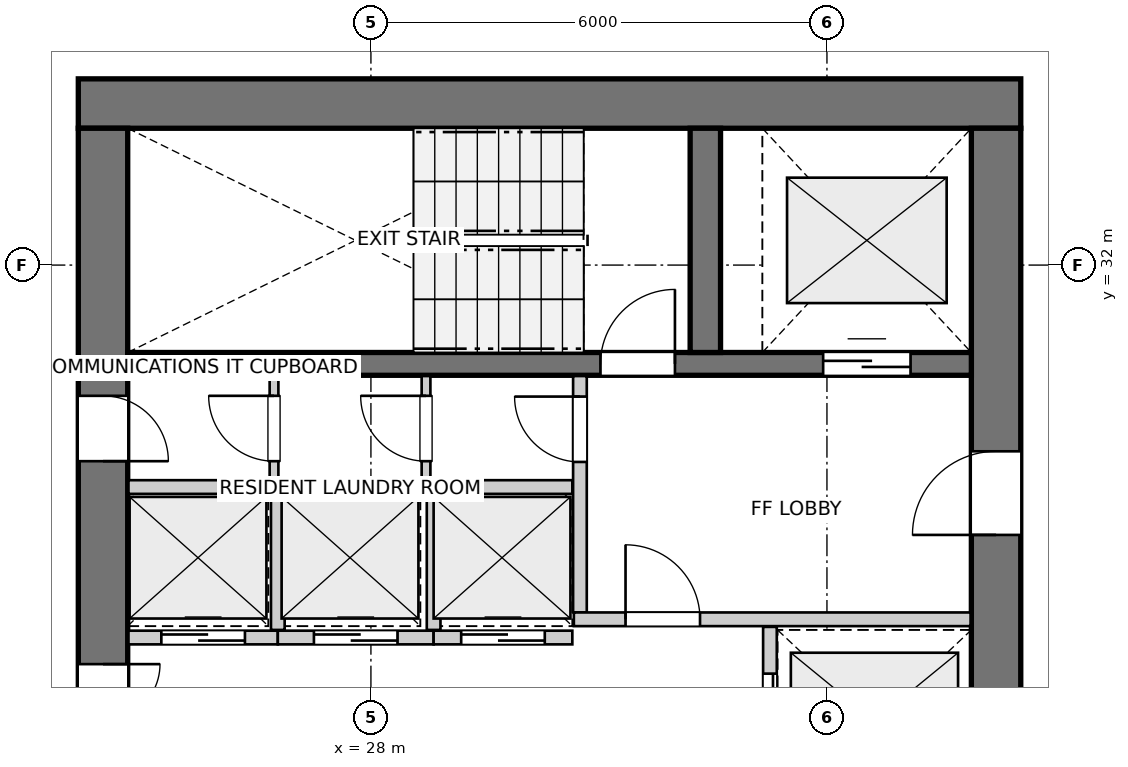
"""IFC4 building model, lengths in metres.
Left out: names, types, materials, properties, quantities, classifications, styles, units other than length and angle.
Written with IfcOpenShell. Run it as: python <this file> out.ifc"""

import sys

from ifc_helpers import new_model, si_unit, direction, frame, frame_2d, origin, place, context, subcontext, project, spatial, rectangle, extrude, source, transform, mapped, element, fill, save


model = new_model("IFC4")
c1 = context("Model", 3, precision=1e-05, world=origin(), true_north=direction((0.0, 1.0)))
c2 = subcontext(c1, "Body", "Model", "MODEL_VIEW")
j1 = project(units=[si_unit("LENGTHUNIT", "METRE"), si_unit("PLANEANGLEUNIT", "RADIAN")], contexts=[c1])
p1 = place(None, origin())
s1 = spatial("IfcSite", under=j1, at=p1, CompositionType="ELEMENT")
p2 = place(p1, origin())
s2 = spatial("IfcBuilding", under=s1, at=p2, CompositionType="ELEMENT")
p3 = place(p2, frame((0.0, 0.0, 158.6)))
s3 = spatial("IfcBuildingStorey", under=s2, at=p3, CompositionType="ELEMENT", Elevation=158.6)
p4 = place(p3, frame((36.55, 34.125, 0.0), z_axis=(0.0, 0.0, 1.0), x_axis=(-1.0, 0.0, 0.0)))
e1 = element("IfcWall", 1, at=p4, inside=s3, PredefinedType="SHEAR", context=c2, shape_type="SweptSolid", body=[
    extrude(rectangle(XDim=12.4, YDim=0.65, at=frame_2d((6.2, 0.0))), origin(), (0.0, 0.0, 1.0), 2.95),
])
p5 = place(p3, frame((24.475, 33.8, 0.0), z_axis=(0.0, 0.0, 1.0), x_axis=(0.0, -1.0, 0.0)))
e2 = element("IfcWall", 2, at=p5, inside=s3, PredefinedType="SHEAR", context=c2, shape_type="SweptSolid", body=[
    extrude(rectangle(XDim=15.6, YDim=0.65, at=frame_2d((7.8, 0.0))), origin(), (0.0, 0.0, 1.0), 2.95),
])
p6 = place(p5, frame((7.05, 0.0, 0.0)))
e3 = element("IfcOpeningElement", 3, at=p6, cuts=e2, PredefinedType="OPENING", context=c2, shape_type="SweptSolid", body=[
    extrude(rectangle(XDim=1.5, YDim=2.15, at=frame_2d((0.75, 1.075))), frame((0.0, 0.335, 0.0), z_axis=(0.0, -1.0, 0.0), x_axis=(1.0, 0.0, 0.0)), (0.0, 0.0, 1.0), 0.67),
])
p7 = place(p5, frame((3.52, 0.0, 0.0)))
e4 = element("IfcOpeningElement", 4, at=p7, cuts=e2, PredefinedType="OPENING", context=c2, shape_type="SweptSolid", body=[
    extrude(rectangle(XDim=0.86, YDim=2.05, at=frame_2d((0.43, 1.025))), frame((0.0, 0.335, 0.0), z_axis=(0.0, -1.0, 0.0), x_axis=(1.0, 0.0, 0.0)), (0.0, 0.0, 1.0), 0.67),
])
p8 = place(p5, frame((11.22, 0.0, 0.0)))
e5 = element("IfcOpeningElement", 5, at=p8, cuts=e2, PredefinedType="OPENING", context=c2, shape_type="SweptSolid", body=[
    extrude(rectangle(XDim=0.86, YDim=2.05, at=frame_2d((0.43, 1.025))), frame((0.0, 0.335, 0.0), z_axis=(0.0, -1.0, 0.0), x_axis=(1.0, 0.0, 0.0)), (0.0, 0.0, 1.0), 0.67),
])
p9 = place(p3, frame((36.225, 18.2, 0.0), z_axis=(0.0, 0.0, 1.0), x_axis=(0.0, 1.0, 0.0)))
e6 = element("IfcWall", 6, at=p9, inside=s3, PredefinedType="SHEAR", context=c2, shape_type="SweptSolid", body=[
    extrude(rectangle(XDim=15.6, YDim=0.65, at=frame_2d((7.8, 0.0))), origin(), (0.0, 0.0, 1.0), 2.95),
])
p10 = place(p9, frame((4.25, 0.0, 0.0)))
e7 = element("IfcOpeningElement", 7, at=p10, cuts=e6, PredefinedType="OPENING", context=c2, shape_type="SweptSolid", body=[
    extrude(rectangle(XDim=1.1, YDim=2.15, at=frame_2d((0.55, 1.075))), frame((0.0, 0.335, 0.0), z_axis=(0.0, -1.0, 0.0), x_axis=(1.0, 0.0, 0.0)), (0.0, 0.0, 1.0), 0.67),
])
p11 = place(p9, frame((10.25, 0.0, 0.0)))
e8 = element("IfcOpeningElement", 8, at=p11, cuts=e6, PredefinedType="OPENING", context=c2, shape_type="SweptSolid", body=[
    extrude(rectangle(XDim=1.1, YDim=2.15, at=frame_2d((0.55, 1.075))), frame((0.0, 0.335, 0.0), z_axis=(0.0, -1.0, 0.0), x_axis=(1.0, 0.0, 0.0)), (0.0, 0.0, 1.0), 0.67),
])
p12 = place(p3, frame((24.8, 30.7, 0.0), z_axis=(0.0, 0.0, 1.0), x_axis=(1.0, 0.0, 0.0)))
e9 = element("IfcWall", 9, at=p12, inside=s3, PredefinedType="SHEAR", context=c2, shape_type="SweptSolid", body=[
    extrude(rectangle(XDim=11.1, YDim=0.3, at=frame_2d((5.55, 0.0))), origin(), (0.0, 0.0, 1.0), 2.95),
])
p13 = place(p12, frame((6.22, 0.0, 0.0)))
e10 = element("IfcOpeningElement", 10, at=p13, cuts=e9, PredefinedType="OPENING", context=c2, shape_type="SweptSolid", body=[
    extrude(rectangle(XDim=0.98, YDim=2.15, at=frame_2d((0.49, 1.075))), frame((0.0, 0.16, 0.0), z_axis=(0.0, -1.0, 0.0), x_axis=(1.0, 0.0, 0.0)), (0.0, 0.0, 1.0), 0.32),
])
p14 = place(p12, frame((9.15, 0.0, 0.0)))
e11 = element("IfcOpeningElement", 11, at=p14, cuts=e9, PredefinedType="OPENING", context=c2, shape_type="SweptSolid", body=[
    extrude(rectangle(XDim=1.15, YDim=2.15, at=frame_2d((0.575, 1.075))), frame((0.0, 0.16, 0.0), z_axis=(0.0, -1.0, 0.0), x_axis=(1.0, 0.0, 0.0)), (0.0, 0.0, 1.0), 0.32),
])
p15 = place(p3, frame((32.4, 30.85, 0.0), z_axis=(0.0, 0.0, 1.0), x_axis=(0.0, 1.0, 0.0)))
e12 = element("IfcWall", 12, at=p15, inside=s3, PredefinedType="SHEAR", context=c2, shape_type="SweptSolid", body=[
    extrude(rectangle(XDim=2.95, YDim=0.4, at=frame_2d((1.475, 0.0))), origin(), (0.0, 0.0, 1.0), 2.95),
])
p16 = place(p3, frame((30.75, 27.43, 0.0), z_axis=(0.0, 0.0, 1.0), x_axis=(0.0, 1.0, 0.0)))
e13 = element("IfcWall", 13, at=p16, inside=s3, PredefinedType="PARTITIONING", context=c2, shape_type="SweptSolid", body=[
    extrude(rectangle(XDim=3.11, YDim=0.18, at=frame_2d((1.555, 0.0))), origin(), (0.0, 0.0, 1.0), 2.95),
])
p17 = place(p16, frame((1.98, 0.0, 0.0)))
e14 = element("IfcOpeningElement", 14, at=p17, cuts=e13, PredefinedType="OPENING", context=c2, shape_type="SweptSolid", body=[
    extrude(rectangle(XDim=0.86, YDim=2.05, at=frame_2d((0.43, 1.025))), frame((0.0, 0.1, 0.0), z_axis=(0.0, -1.0, 0.0), x_axis=(1.0, 0.0, 0.0)), (0.0, 0.0, 1.0), 0.2),
])
p18 = place(p3, frame((30.67, 27.34, 0.0), z_axis=(0.0, 0.0, 1.0), x_axis=(1.0, 0.0, 0.0)))
e15 = element("IfcWall", 15, at=p18, inside=s3, PredefinedType="PARTITIONING", context=c2, shape_type="SweptSolid", body=[
    extrude(rectangle(XDim=5.22, YDim=0.18, at=frame_2d((2.61, 0.0))), origin(), (0.0, 0.0, 1.0), 2.95),
])
p19 = place(p18, frame((0.68, 0.0, 0.0)))
e16 = element("IfcOpeningElement", 16, at=p19, cuts=e15, PredefinedType="OPENING", context=c2, shape_type="SweptSolid", body=[
    extrude(rectangle(XDim=0.98, YDim=2.15, at=frame_2d((0.49, 1.075))), frame((0.0, 0.1, 0.0), z_axis=(0.0, -1.0, 0.0), x_axis=(1.0, 0.0, 0.0)), (0.0, 0.0, 1.0), 0.2),
])
p20 = place(p3, frame((33.25, 24.76, 0.0), z_axis=(0.0, 0.0, 1.0), x_axis=(0.0, 1.0, 0.0)))
e17 = element("IfcWall", 17, at=p20, inside=s3, PredefinedType="PARTITIONING", context=c2, shape_type="SweptSolid", body=[
    extrude(rectangle(XDim=2.48, YDim=0.18, at=frame_2d((1.24, 0.0))), origin(), (0.0, 0.0, 1.0), 2.95),
])
p21 = place(p20, frame((0.615, 0.0, 0.0)))
e18 = element("IfcOpeningElement", 18, at=p21, cuts=e17, PredefinedType="OPENING", context=c2, shape_type="SweptSolid", body=[
    extrude(rectangle(XDim=1.25, YDim=2.15, at=frame_2d((0.625, 1.075))), frame((0.0, 0.1, 0.0), z_axis=(0.0, -1.0, 0.0), x_axis=(1.0, 0.0, 0.0)), (0.0, 0.0, 1.0), 0.2),
])
p22 = place(p3, frame((24.81, 29.08, 0.0), z_axis=(0.0, 0.0, 1.0), x_axis=(1.0, 0.0, 0.0)))
e19 = element("IfcWall", 19, at=p22, inside=s3, PredefinedType="PARTITIONING", context=c2, shape_type="SweptSolid", body=[
    extrude(rectangle(XDim=5.84, YDim=0.18, at=frame_2d((2.92, 0.0))), origin(), (0.0, 0.0, 1.0), 2.95),
])
p23 = place(p3, frame((24.81, 27.1, 0.0), z_axis=(0.0, 0.0, 1.0), x_axis=(1.0, 0.0, 0.0)))
e20 = element("IfcWall", 20, at=p23, inside=s3, PredefinedType="PARTITIONING", context=c2, shape_type="SweptSolid", body=[
    extrude(rectangle(XDim=1.965, YDim=0.18, at=frame_2d((0.982, 0.0))), origin(), (0.0, 0.0, 1.0), 2.95),
])
p24 = place(p23, frame((0.433, 0.0, 0.0)))
e21 = element("IfcOpeningElement", 21, at=p24, cuts=e20, PredefinedType="OPENING", context=c2, shape_type="SweptSolid", body=[
    extrude(rectangle(XDim=1.1, YDim=2.15, at=frame_2d((0.55, 1.075))), frame((0.0, 0.1, 0.0), z_axis=(0.0, -1.0, 0.0), x_axis=(1.0, 0.0, 0.0)), (0.0, 0.0, 1.0), 0.2),
])
p25 = place(p3, frame((26.775, 27.1, 0.0), z_axis=(0.0, 0.0, 1.0), x_axis=(1.0, 0.0, 0.0)))
e22 = element("IfcWall", 22, at=p25, inside=s3, PredefinedType="PARTITIONING", context=c2, shape_type="SweptSolid", body=[
    extrude(rectangle(XDim=2.05, YDim=0.18, at=frame_2d((1.025, 0.0))), origin(), (0.0, 0.0, 1.0), 2.95),
])
p26 = place(p25, frame((0.475, 0.0, 0.0)))
e23 = element("IfcOpeningElement", 23, at=p26, cuts=e22, PredefinedType="OPENING", context=c2, shape_type="SweptSolid", body=[
    extrude(rectangle(XDim=1.1, YDim=2.15, at=frame_2d((0.55, 1.075))), frame((0.0, 0.1, 0.0), z_axis=(0.0, -1.0, 0.0), x_axis=(1.0, 0.0, 0.0)), (0.0, 0.0, 1.0), 0.2),
])
p27 = place(p3, frame((26.775, 27.2, 0.0), z_axis=(0.0, 0.0, 1.0), x_axis=(0.0, 1.0, 0.0)))
e24 = element("IfcWall", 24, at=p27, inside=s3, PredefinedType="PARTITIONING", context=c2, shape_type="SweptSolid", body=[
    extrude(rectangle(XDim=1.78, YDim=0.18, at=frame_2d((0.89, 0.0))), origin(), (0.0, 0.0, 1.0), 2.95),
])
p28 = place(p3, frame((28.825, 27.1, 0.0), z_axis=(0.0, 0.0, 1.0), x_axis=(1.0, 0.0, 0.0)))
e25 = element("IfcWall", 25, at=p28, inside=s3, PredefinedType="PARTITIONING", context=c2, shape_type="SweptSolid", body=[
    extrude(rectangle(XDim=1.825, YDim=0.18, at=frame_2d((0.913, 0.0))), origin(), (0.0, 0.0, 1.0), 2.95),
])
p29 = place(p28, frame((0.363, 0.0, 0.0)))
e26 = element("IfcOpeningElement", 26, at=p29, cuts=e25, PredefinedType="OPENING", context=c2, shape_type="SweptSolid", body=[
    extrude(rectangle(XDim=1.1, YDim=2.15, at=frame_2d((0.55, 1.075))), frame((0.0, 0.1, 0.0), z_axis=(0.0, -1.0, 0.0), x_axis=(1.0, 0.0, 0.0)), (0.0, 0.0, 1.0), 0.2),
])
p30 = place(p3, frame((28.825, 27.2, 0.0), z_axis=(0.0, 0.0, 1.0), x_axis=(0.0, 1.0, 0.0)))
e27 = element("IfcWall", 27, at=p30, inside=s3, PredefinedType="PARTITIONING", context=c2, shape_type="SweptSolid", body=[
    extrude(rectangle(XDim=1.78, YDim=0.18, at=frame_2d((0.89, 0.0))), origin(), (0.0, 0.0, 1.0), 2.95),
])
p31 = place(p3, frame((26.725, 29.16, 0.0), z_axis=(0.0, 0.0, 1.0), x_axis=(0.0, 1.0, 0.0)))
e28 = element("IfcWall", 28, at=p31, inside=s3, PredefinedType="PARTITIONING", context=c2, shape_type="SweptSolid", body=[
    extrude(rectangle(XDim=1.38, YDim=0.115, at=frame_2d((0.69, 0.0))), origin(), (0.0, 0.0, 1.0), 2.95),
])
p32 = place(p31, frame((0.26, 0.0, 0.0)))
e29 = element("IfcOpeningElement", 29, at=p32, cuts=e28, PredefinedType="OPENING", context=c2, shape_type="SweptSolid", body=[
    extrude(rectangle(XDim=0.86, YDim=2.05, at=frame_2d((0.43, 1.025))), frame((0.0, 0.067, 0.0), z_axis=(0.0, -1.0, 0.0), x_axis=(1.0, 0.0, 0.0)), (0.0, 0.0, 1.0), 0.135),
])
p33 = place(p3, frame((28.725, 29.16, 0.0), z_axis=(0.0, 0.0, 1.0), x_axis=(0.0, 1.0, 0.0)))
e30 = element("IfcWall", 30, at=p33, inside=s3, PredefinedType="PARTITIONING", context=c2, shape_type="SweptSolid", body=[
    extrude(rectangle(XDim=1.38, YDim=0.115, at=frame_2d((0.69, 0.0))), origin(), (0.0, 0.0, 1.0), 2.95),
])
p34 = place(p33, frame((0.26, 0.0, 0.0)))
e31 = element("IfcOpeningElement", 31, at=p34, cuts=e30, PredefinedType="OPENING", context=c2, shape_type="SweptSolid", body=[
    extrude(rectangle(XDim=0.86, YDim=2.05, at=frame_2d((0.43, 1.025))), frame((0.0, 0.067, 0.0), z_axis=(0.0, -1.0, 0.0), x_axis=(1.0, 0.0, 0.0)), (0.0, 0.0, 1.0), 0.135),
])
m1 = source(origin(), c2, "Body", "SweptSolid", [
    extrude(rectangle(XDim=0.98, YDim=2.15, at=frame_2d((0.49, 1.075))), frame((0.0, 0.025, 0.0), z_axis=(0.0, -1.0, 0.0), x_axis=(1.0, 0.0, 0.0)), (0.0, 0.0, 1.0), 0.05),
])
p35 = place(p13, origin())
e32 = element("IfcDoor", 32, at=p35, inside=s3, OperationType="SINGLE_SWING_RIGHT", PredefinedType="DOOR", context=c2, shape_type="MappedRepresentation", body=[
    mapped(m1, transform((0.0, 0.0, 0.0), x_axis=(1.0, 0.0, 0.0), y_axis=(0.0, 1.0, 0.0), z_axis=(0.0, 0.0, 1.0), scale=1.0)),
])
fill(e10, e32)
m2 = source(origin(), c2, "Body", "SweptSolid", [
    extrude(rectangle(XDim=1.15, YDim=2.15, at=frame_2d((0.575, 1.075))), frame((0.0, 0.025, 0.0), z_axis=(0.0, -1.0, 0.0), x_axis=(1.0, 0.0, 0.0)), (0.0, 0.0, 1.0), 0.05),
])
p36 = place(p14, origin())
e33 = element("IfcDoor", 33, at=p36, inside=s3, OperationType="DOUBLE_DOOR_SLIDING", PredefinedType="DOOR", context=c2, shape_type="MappedRepresentation", body=[
    mapped(m2, transform((0.0, 0.0, 0.0), x_axis=(1.0, 0.0, 0.0), y_axis=(0.0, 1.0, 0.0), z_axis=(0.0, 0.0, 1.0), scale=1.0)),
])
fill(e11, e33)
m3 = source(origin(), c2, "Body", "SweptSolid", [
    extrude(rectangle(XDim=1.1, YDim=2.15, at=frame_2d((0.55, 1.075))), frame((0.0, 0.025, 0.0), z_axis=(0.0, -1.0, 0.0), x_axis=(1.0, 0.0, 0.0)), (0.0, 0.0, 1.0), 0.05),
])
p37 = place(p11, origin())
e34 = element("IfcDoor", 34, at=p37, inside=s3, OperationType="SINGLE_SWING_LEFT", PredefinedType="DOOR", context=c2, shape_type="MappedRepresentation", body=[
    mapped(m3, transform((0.0, 0.0, 0.0), x_axis=(1.0, 0.0, 0.0), y_axis=(0.0, 1.0, 0.0), z_axis=(0.0, 0.0, 1.0), scale=1.0)),
])
fill(e8, e34)
m4 = source(origin(), c2, "Body", "SweptSolid", [
    extrude(rectangle(XDim=1.5, YDim=2.15, at=frame_2d((0.75, 1.075))), frame((0.0, 0.025, 0.0), z_axis=(0.0, -1.0, 0.0), x_axis=(1.0, 0.0, 0.0)), (0.0, 0.0, 1.0), 0.05),
])
p38 = place(p6, origin())
e35 = element("IfcDoor", 35, at=p38, inside=s3, OperationType="DOUBLE_DOOR_SINGLE_SWING", PredefinedType="DOOR", context=c2, shape_type="MappedRepresentation", body=[
    mapped(m4, transform((0.0, 0.0, 0.0), x_axis=(1.0, 0.0, 0.0), y_axis=(0.0, 1.0, 0.0), z_axis=(0.0, 0.0, 1.0), scale=1.0)),
])
fill(e3, e35)
m5 = source(origin(), c2, "Body", "SweptSolid", [
    extrude(rectangle(XDim=0.86, YDim=2.05, at=frame_2d((0.43, 1.025))), frame((0.0, 0.025, 0.0), z_axis=(0.0, -1.0, 0.0), x_axis=(1.0, 0.0, 0.0)), (0.0, 0.0, 1.0), 0.05),
])
p39 = place(p7, origin())
e36 = element("IfcDoor", 36, at=p39, inside=s3, OperationType="SINGLE_SWING_RIGHT", PredefinedType="DOOR", context=c2, shape_type="MappedRepresentation", body=[
    mapped(m5, transform((0.0, 0.0, 0.0), x_axis=(1.0, 0.0, 0.0), y_axis=(0.0, 1.0, 0.0), z_axis=(0.0, 0.0, 1.0), scale=1.0)),
])
fill(e4, e36)
p40 = place(p17, origin())
e37 = element("IfcDoor", 37, at=p40, inside=s3, OperationType="SINGLE_SWING_RIGHT", PredefinedType="DOOR", context=c2, shape_type="MappedRepresentation", body=[
    mapped(m5, transform((0.0, 0.0, 0.0), x_axis=(1.0, 0.0, 0.0), y_axis=(0.0, 1.0, 0.0), z_axis=(0.0, 0.0, 1.0), scale=1.0)),
])
fill(e14, e37)
p41 = place(p19, origin())
e38 = element("IfcDoor", 38, at=p41, inside=s3, OperationType="SINGLE_SWING_LEFT", PredefinedType="DOOR", context=c2, shape_type="MappedRepresentation", body=[
    mapped(m1, transform((0.0, 0.0, 0.0), x_axis=(1.0, 0.0, 0.0), y_axis=(0.0, 1.0, 0.0), z_axis=(0.0, 0.0, 1.0), scale=1.0)),
])
fill(e16, e38)
m6 = source(origin(), c2, "Body", "SweptSolid", [
    extrude(rectangle(XDim=1.25, YDim=2.15, at=frame_2d((0.625, 1.075))), frame((0.0, 0.025, 0.0), z_axis=(0.0, -1.0, 0.0), x_axis=(1.0, 0.0, 0.0)), (0.0, 0.0, 1.0), 0.05),
])
p42 = place(p21, origin())
e39 = element("IfcDoor", 39, at=p42, inside=s3, OperationType="DOUBLE_DOOR_SLIDING", PredefinedType="DOOR", context=c2, shape_type="MappedRepresentation", body=[
    mapped(m6, transform((0.0, 0.0, 0.0), x_axis=(1.0, 0.0, 0.0), y_axis=(0.0, 1.0, 0.0), z_axis=(0.0, 0.0, 1.0), scale=1.0)),
])
fill(e18, e39)
p43 = place(p24, origin())
e40 = element("IfcDoor", 40, at=p43, inside=s3, OperationType="DOUBLE_DOOR_SLIDING", PredefinedType="DOOR", context=c2, shape_type="MappedRepresentation", body=[
    mapped(m3, transform((0.0, 0.0, 0.0), x_axis=(1.0, 0.0, 0.0), y_axis=(0.0, 1.0, 0.0), z_axis=(0.0, 0.0, 1.0), scale=1.0)),
])
fill(e21, e40)
p44 = place(p26, origin())
e41 = element("IfcDoor", 41, at=p44, inside=s3, OperationType="DOUBLE_DOOR_SLIDING", PredefinedType="DOOR", context=c2, shape_type="MappedRepresentation", body=[
    mapped(m3, transform((0.0, 0.0, 0.0), x_axis=(1.0, 0.0, 0.0), y_axis=(0.0, 1.0, 0.0), z_axis=(0.0, 0.0, 1.0), scale=1.0)),
])
fill(e23, e41)
p45 = place(p29, origin())
e42 = element("IfcDoor", 42, at=p45, inside=s3, OperationType="DOUBLE_DOOR_SLIDING", PredefinedType="DOOR", context=c2, shape_type="MappedRepresentation", body=[
    mapped(m3, transform((0.0, 0.0, 0.0), x_axis=(1.0, 0.0, 0.0), y_axis=(0.0, 1.0, 0.0), z_axis=(0.0, 0.0, 1.0), scale=1.0)),
])
fill(e26, e42)
p46 = place(p32, origin())
e43 = element("IfcDoor", 43, at=p46, inside=s3, OperationType="SINGLE_SWING_RIGHT", PredefinedType="DOOR", context=c2, shape_type="MappedRepresentation", body=[
    mapped(m5, transform((0.0, 0.0, 0.0), x_axis=(1.0, 0.0, 0.0), y_axis=(0.0, 1.0, 0.0), z_axis=(0.0, 0.0, 1.0), scale=1.0)),
])
fill(e29, e43)
p47 = place(p34, origin())
e44 = element("IfcDoor", 44, at=p47, inside=s3, OperationType="SINGLE_SWING_RIGHT", PredefinedType="DOOR", context=c2, shape_type="MappedRepresentation", body=[
    mapped(m5, transform((0.0, 0.0, 0.0), x_axis=(1.0, 0.0, 0.0), y_axis=(0.0, 1.0, 0.0), z_axis=(0.0, 0.0, 1.0), scale=1.0)),
])
fill(e31, e44)
save(model, sys.argv[1])
